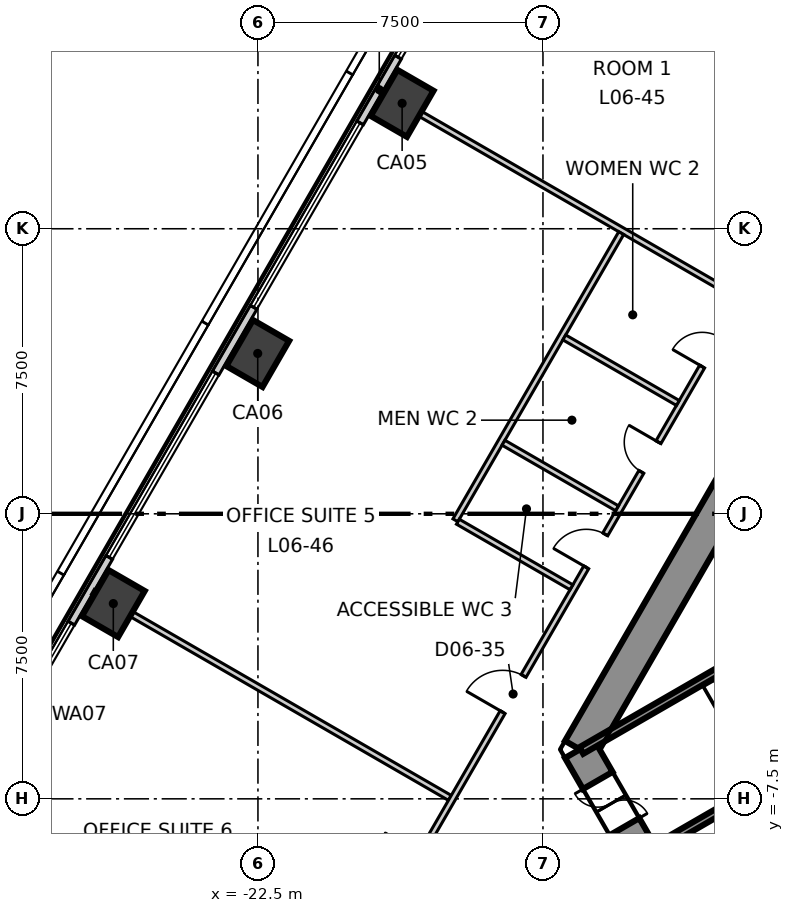
"""IFC4 building model, lengths in metres.
Left out: names, types, materials, properties, quantities, classifications, styles, units other than length and angle.
Written with IfcOpenShell. Run it as: python <this file> out.ifc"""

import sys

from ifc_helpers import new_model, si_unit, direction, frame, frame_2d, origin, origin_2d, place, context, subcontext, project, spatial, polyline, rectangle, outline, extrude, element, fill, save


model = new_model("IFC4")
c1 = context("Model", 3, precision=1e-05, world=origin(), true_north=direction((0.0, 1.0)))
c2 = subcontext(c1, "Body", "Model", "MODEL_VIEW")
j1 = project(units=[si_unit("LENGTHUNIT", "METRE"), si_unit("PLANEANGLEUNIT", "RADIAN")], contexts=[c1])
p1 = place(None, origin())
s1 = spatial("IfcSite", under=j1, at=p1, CompositionType="ELEMENT")
p2 = place(p1, origin())
s2 = spatial("IfcBuilding", under=s1, at=p2, CompositionType="ELEMENT")
p3 = place(p2, frame((0.0, 0.0, 35.3)))
s3 = spatial("IfcBuildingStorey", under=s2, at=p3, CompositionType="ELEMENT", Elevation=35.3)
p4 = place(p3, frame((-1.645, 15.25, -0.3), z_axis=(0.0, 0.0, 1.0), x_axis=(-0.500026485275, -0.866010111964, 0.0)))
e1 = element("IfcWall", 1, at=p4, inside=s3, PredefinedType="SHEAR", context=c2, shape_type="SweptSolid", body=[
    extrude(outline(polyline([(-0.26, -0.45), (1.685, -0.45), (3.63, -0.45), (5.576, -0.45), (7.521, -0.45), (9.466, -0.449), (11.411, -0.449), (13.357, -0.449), (15.302, -0.449), (17.247, -0.449), (19.192, -0.449), (21.138, -0.449), (23.083, -0.449), (25.028, -0.449), (24.509, 0.45), (22.644, 0.45), (20.778, 0.45), (18.913, 0.45), (17.048, 0.45), (15.182, 0.449), (13.317, 0.449), (11.452, 0.449), (9.587, 0.449), (7.721, 0.449), (5.856, 0.449), (3.991, 0.449), (2.125, 0.449), (0.26, 0.449), (-0.26, -0.45)])), origin(), (0.0, 0.0, 1.0), 4.0),
])
p5 = place(p4, frame((11.834, 0.0, 0.3)))
e2 = element("IfcOpeningElement", 2, at=p5, cuts=e1, PredefinedType="OPENING", context=c2, shape_type="SweptSolid", body=[
    extrude(rectangle(XDim=1.1, YDim=2.1, at=frame_2d((0.55, 1.05))), frame((0.0, 0.46, 0.0), z_axis=(0.0, -1.0, 0.0), x_axis=(1.0, 0.0, 0.0)), (0.0, 0.0, 1.0), 0.92),
])
p6 = place(p4, frame((4.842, 0.0, 0.3)))
e3 = element("IfcOpeningElement", 3, at=p6, cuts=e1, PredefinedType="OPENING", context=c2, shape_type="SweptSolid", body=[
    extrude(rectangle(XDim=1.0, YDim=2.1, at=frame_2d((0.5, 1.05))), frame((0.0, 0.46, 0.0), z_axis=(0.0, -1.0, 0.0), x_axis=(1.0, 0.0, 0.0)), (0.0, 0.0, 1.0), 0.92),
])
p7 = place(p3, frame((-14.03, -6.2, -0.3), z_axis=(0.0, 0.0, 1.0), x_axis=(0.500111984565, -0.865960739811, 0.0)))
e4 = element("IfcWall", 4, at=p7, inside=s3, PredefinedType="SHEAR", context=c2, shape_type="SweptSolid", body=[
    extrude(outline(polyline([(-0.26, -0.449), (1.646, -0.449), (3.551, -0.45), (3.032, 0.45), (1.646, 0.45), (0.26, 0.45), (-0.26, -0.449)])), origin(), (0.0, 0.0, 1.0), 4.0),
])
p8 = place(p7, frame((0.946, 0.0, 0.3)))
e5 = element("IfcOpeningElement", 5, at=p8, cuts=e4, PredefinedType="OPENING", context=c2, shape_type="SweptSolid", body=[
    extrude(rectangle(XDim=1.4, YDim=2.1, at=frame_2d((0.7, 1.05))), frame((0.0, 0.46, 0.0), z_axis=(0.0, -1.0, 0.0), x_axis=(1.0, 0.0, 0.0)), (0.0, 0.0, 1.0), 0.92),
])
for number, where, z_axis, x_axis in (
    (6, (-18.706, 10.8, -0.3), (0.0, 0.0, 1.0), (0.5, 0.866, 0.0)),
    (7, (-22.506, 4.219, -0.3), (0.0, 0.0, 1.0), (0.5, 0.866, 0.0)),
    (8, (-26.306, -2.362, -0.3), (0.0, 0.0, 1.0), (0.5, 0.866, 0.0)),
):
    element("IfcColumn", number, at=place(p3, frame(where, z_axis=z_axis, x_axis=x_axis)), inside=s3, PredefinedType="COLUMN", context=c2, shape_type="SweptSolid", body=[
        extrude(rectangle(XDim=1.4, YDim=1.1, at=origin_2d()), origin(), (0.0, 0.0, 1.0), 4.0),
    ])
p9 = place(p3, frame((-3.462, 38.603, 0.0), z_axis=(0.0, 0.0, 1.0), x_axis=(-0.500012207976, -0.866018355391, 0.0)))
e9 = element("IfcWall", 9, at=p9, inside=s3, PredefinedType="ELEMENTEDWALL", context=c2, shape_type="SweptSolid", body=[
    extrude(rectangle(XDim=63.381, YDim=0.2, at=frame_2d((31.69, 0.0))), origin(), (0.0, 0.0, 1.0), 3.7),
])
p10 = place(p9, frame((2.302, 0.0, 0.9)))
e10 = element("IfcOpeningElement", 10, at=p10, cuts=e9, PredefinedType="OPENING", context=c2, shape_type="SweptSolid", body=[
    extrude(rectangle(XDim=5.6, YDim=2.5, at=frame_2d((2.8, 1.25))), frame((0.0, 0.11, 0.0), z_axis=(0.0, -1.0, 0.0), x_axis=(1.0, 0.0, 0.0)), (0.0, 0.0, 1.0), 0.22),
])
p11 = place(p9, frame((9.902, 0.0, 0.9)))
e11 = element("IfcOpeningElement", 11, at=p11, cuts=e9, PredefinedType="OPENING", context=c2, shape_type="SweptSolid", body=[
    extrude(rectangle(XDim=5.6, YDim=2.5, at=frame_2d((2.8, 1.25))), frame((0.0, 0.11, 0.0), z_axis=(0.0, -1.0, 0.0), x_axis=(1.0, 0.0, 0.0)), (0.0, 0.0, 1.0), 0.22),
])
p12 = place(p9, frame((17.501, 0.0, 0.9)))
e12 = element("IfcOpeningElement", 12, at=p12, cuts=e9, PredefinedType="OPENING", context=c2, shape_type="SweptSolid", body=[
    extrude(rectangle(XDim=5.6, YDim=2.5, at=frame_2d((2.8, 1.25))), frame((0.0, 0.11, 0.0), z_axis=(0.0, -1.0, 0.0), x_axis=(1.0, 0.0, 0.0)), (0.0, 0.0, 1.0), 0.22),
])
p13 = place(p9, frame((25.1, 0.0, 0.9)))
e13 = element("IfcOpeningElement", 13, at=p13, cuts=e9, PredefinedType="OPENING", context=c2, shape_type="SweptSolid", body=[
    extrude(rectangle(XDim=5.6, YDim=2.5, at=frame_2d((2.8, 1.25))), frame((0.0, 0.11, 0.0), z_axis=(0.0, -1.0, 0.0), x_axis=(1.0, 0.0, 0.0)), (0.0, 0.0, 1.0), 0.22),
])
p14 = place(p9, frame((32.7, 0.0, 0.9)))
e14 = element("IfcOpeningElement", 14, at=p14, cuts=e9, PredefinedType="OPENING", context=c2, shape_type="SweptSolid", body=[
    extrude(rectangle(XDim=5.6, YDim=2.5, at=frame_2d((2.8, 1.25))), frame((0.0, 0.11, 0.0), z_axis=(0.0, -1.0, 0.0), x_axis=(1.0, 0.0, 0.0)), (0.0, 0.0, 1.0), 0.22),
])
p15 = place(p9, frame((40.299, 0.0, 0.9)))
e15 = element("IfcOpeningElement", 15, at=p15, cuts=e9, PredefinedType="OPENING", context=c2, shape_type="SweptSolid", body=[
    extrude(rectangle(XDim=5.6, YDim=2.5, at=frame_2d((2.8, 1.25))), frame((0.0, 0.11, 0.0), z_axis=(0.0, -1.0, 0.0), x_axis=(1.0, 0.0, 0.0)), (0.0, 0.0, 1.0), 0.22),
])
p16 = place(p9, frame((47.899, 0.0, 0.9)))
e16 = element("IfcOpeningElement", 16, at=p16, cuts=e9, PredefinedType="OPENING", context=c2, shape_type="SweptSolid", body=[
    extrude(rectangle(XDim=5.6, YDim=2.5, at=frame_2d((2.8, 1.25))), frame((0.0, 0.11, 0.0), z_axis=(0.0, -1.0, 0.0), x_axis=(1.0, 0.0, 0.0)), (0.0, 0.0, 1.0), 0.22),
])
p17 = place(p9, frame((55.498, 0.0, 0.9)))
e17 = element("IfcOpeningElement", 17, at=p17, cuts=e9, PredefinedType="OPENING", context=c2, shape_type="SweptSolid", body=[
    extrude(rectangle(XDim=5.6, YDim=2.5, at=frame_2d((2.8, 1.25))), frame((0.0, 0.11, 0.0), z_axis=(0.0, -1.0, 0.0), x_axis=(1.0, 0.0, 0.0)), (0.0, 0.0, 1.0), 0.22),
])
p18 = place(p3, frame((-26.843, -2.052, 0.0), z_axis=(0.0, 0.0, 1.0), x_axis=(0.86602515287, -0.500000434597, 0.0)))
e18 = element("IfcWall", 18, at=p18, inside=s3, PredefinedType="PARTITIONING", context=c2, shape_type="SweptSolid", body=[
    extrude(rectangle(XDim=10.846, YDim=0.15, at=frame_2d((5.423, 0.0))), origin(), (0.0, 0.0, 1.0), 3.7),
])
p19 = place(p3, frame((-19.497, -11.17, 0.0), z_axis=(0.0, 0.0, 1.0), x_axis=(0.499998854553, 0.866026065108, 0.0)))
e19 = element("IfcWall", 19, at=p19, inside=s3, PredefinedType="PARTITIONING", context=c2, shape_type="SweptSolid", body=[
    extrude(rectangle(XDim=38.994, YDim=0.15, at=frame_2d((19.497, 0.0))), origin(), (0.0, 0.0, 1.0), 3.7),
])
p20 = place(p19, frame((36.244, 0.0, 0.0)))
e20 = element("IfcOpeningElement", 20, at=p20, cuts=e19, PredefinedType="OPENING", context=c2, shape_type="SweptSolid", body=[
    extrude(rectangle(XDim=1.1, YDim=2.1, at=frame_2d((0.55, 1.05))), frame((0.0, 0.085, 0.0), z_axis=(0.0, -1.0, 0.0), x_axis=(1.0, 0.0, 0.0)), (0.0, 0.0, 1.0), 0.17),
])
p21 = place(p19, frame((29.171, 0.0, 0.0)))
e21 = element("IfcOpeningElement", 21, at=p21, cuts=e19, PredefinedType="OPENING", context=c2, shape_type="SweptSolid", body=[
    extrude(rectangle(XDim=1.0, YDim=2.1, at=frame_2d((0.5, 1.05))), frame((0.0, 0.085, 0.0), z_axis=(0.0, -1.0, 0.0), x_axis=(1.0, 0.0, 0.0)), (0.0, 0.0, 1.0), 0.17),
])
p22 = place(p19, frame((32.971, 0.0, 0.0)))
e22 = element("IfcOpeningElement", 22, at=p22, cuts=e19, PredefinedType="OPENING", context=c2, shape_type="SweptSolid", body=[
    extrude(rectangle(XDim=0.9, YDim=2.1, at=frame_2d((0.45, 1.05))), frame((0.0, 0.085, 0.0), z_axis=(0.0, -1.0, 0.0), x_axis=(1.0, 0.0, 0.0)), (0.0, 0.0, 1.0), 0.17),
])
p23 = place(p19, frame((22.771, 0.0, 0.0)))
e23 = element("IfcOpeningElement", 23, at=p23, cuts=e19, PredefinedType="OPENING", context=c2, shape_type="SweptSolid", body=[
    extrude(rectangle(XDim=1.0, YDim=2.1, at=frame_2d((0.5, 1.05))), frame((0.0, 0.085, 0.0), z_axis=(0.0, -1.0, 0.0), x_axis=(1.0, 0.0, 0.0)), (0.0, 0.0, 1.0), 0.17),
])
p24 = place(p19, frame((6.872, 0.0, 0.0)))
e24 = element("IfcOpeningElement", 24, at=p24, cuts=e19, PredefinedType="OPENING", context=c2, shape_type="SweptSolid", body=[
    extrude(rectangle(XDim=1.1, YDim=2.1, at=frame_2d((0.55, 1.05))), frame((0.0, 0.085, 0.0), z_axis=(0.0, -1.0, 0.0), x_axis=(1.0, 0.0, 0.0)), (0.0, 0.0, 1.0), 0.17),
])
p25 = place(p19, frame((17.372, 0.0, 0.0)))
e25 = element("IfcOpeningElement", 25, at=p25, cuts=e19, PredefinedType="OPENING", context=c2, shape_type="SweptSolid", body=[
    extrude(rectangle(XDim=0.9, YDim=2.1, at=frame_2d((0.45, 1.05))), frame((0.0, 0.085, 0.0), z_axis=(0.0, -1.0, 0.0), x_axis=(1.0, 0.0, 0.0)), (0.0, 0.0, 1.0), 0.17),
])
p26 = place(p19, frame((14.172, 0.0, 0.0)))
e26 = element("IfcOpeningElement", 26, at=p26, cuts=e19, PredefinedType="OPENING", context=c2, shape_type="SweptSolid", body=[
    extrude(rectangle(XDim=0.9, YDim=2.1, at=frame_2d((0.45, 1.05))), frame((0.0, 0.085, 0.0), z_axis=(0.0, -1.0, 0.0), x_axis=(1.0, 0.0, 0.0)), (0.0, 0.0, 1.0), 0.17),
])
p27 = place(p19, frame((11.272, 0.0, 0.0)))
e27 = element("IfcOpeningElement", 27, at=p27, cuts=e19, PredefinedType="OPENING", context=c2, shape_type="SweptSolid", body=[
    extrude(rectangle(XDim=1.0, YDim=2.1, at=frame_2d((0.5, 1.05))), frame((0.0, 0.085, 0.0), z_axis=(0.0, -1.0, 0.0), x_axis=(1.0, 0.0, 0.0)), (0.0, 0.0, 1.0), 0.17),
])
p28 = place(p19, frame((1.473, 0.0, 0.0)))
e28 = element("IfcOpeningElement", 28, at=p28, cuts=e19, PredefinedType="OPENING", context=c2, shape_type="SweptSolid", body=[
    extrude(rectangle(XDim=1.1, YDim=2.1, at=frame_2d((0.55, 1.05))), frame((0.0, 0.085, 0.0), z_axis=(0.0, -1.0, 0.0), x_axis=(1.0, 0.0, 0.0)), (0.0, 0.0, 1.0), 0.17),
])
p29 = place(p3, frame((-19.243, 11.11, 0.0), z_axis=(0.0, 0.0, 1.0), x_axis=(0.866036004841, -0.499981637982, 0.0)))
e29 = element("IfcWall", 29, at=p29, inside=s3, PredefinedType="PARTITIONING", context=c2, shape_type="SweptSolid", body=[
    extrude(rectangle(XDim=10.845, YDim=0.15, at=frame_2d((5.422, 0.0))), origin(), (0.0, 0.0, 1.0), 3.2),
])
p30 = place(p3, frame((-17.304, -0.171, 0.0), z_axis=(0.0, 0.0, 1.0), x_axis=(0.500054279689, 0.865994063124, 0.0)))
e30 = element("IfcWall", 30, at=p30, inside=s3, PredefinedType="PARTITIONING", context=c2, shape_type="SweptSolid", body=[
    extrude(rectangle(XDim=8.725, YDim=0.15, at=frame_2d((4.363, 0.0))), origin(), (0.0, 0.0, 1.0), 3.7),
])
for number, where, z_axis, x_axis in (
    (31, (-17.239, -0.208, 0.0), (0.0, 0.0, 1.0), (0.866, -0.5, 0.0)),
    (32, (-16.039, 1.87, 0.0), (0.0, 0.0, 1.0), (0.866, -0.5, 0.0)),
    (33, (-14.439, 4.641, 0.0), (0.0, 0.0, 1.0), (0.866, -0.5, 0.0)),
):
    element("IfcWall", number, at=place(p3, frame(where, z_axis=z_axis, x_axis=x_axis)), inside=s3, PredefinedType="PARTITIONING", context=c2, shape_type="SweptSolid", body=[
        extrude(rectangle(XDim=3.45, YDim=0.15, at=frame_2d((1.725, 0.0))), origin(), (0.0, 0.0, 1.0), 3.7),
    ])
p31 = place(p3, frame((-13.99, -6.229, 0.0), z_axis=(0.0, 0.0, 1.0), x_axis=(0.866060059011, 0.499939970583, 0.0)))
e34 = element("IfcWall", 34, at=p31, inside=s3, PredefinedType="SOLIDWALL", context=c2, shape_type="SweptSolid", body=[
    extrude(rectangle(XDim=8.615, YDim=0.2, at=frame_2d((4.307, 0.0))), origin(), (0.0, 0.0, 1.0), 3.7),
])
p32 = place(p3, frame((-12.39, -9.001, 0.0), z_axis=(0.0, 0.0, 1.0), x_axis=(0.866010975815, 0.500024989144, 0.0)))
e35 = element("IfcWall", 35, at=p32, inside=s3, PredefinedType="SOLIDWALL", context=c2, shape_type="SweptSolid", body=[
    extrude(rectangle(XDim=8.615, YDim=0.2, at=frame_2d((4.308, 0.0))), origin(), (0.0, 0.0, 1.0), 3.7),
])
p33 = place(p13, origin())
e36 = element("IfcWindow", 36, at=p33, inside=s3, PartitioningType="SINGLE_PANEL", PredefinedType="WINDOW", context=c2, shape_type="SweptSolid", body=[
    extrude(rectangle(XDim=5.6, YDim=2.5, at=frame_2d((2.8, 1.25))), frame((0.0, 0.03, 0.0), z_axis=(0.0, -1.0, 0.0), x_axis=(1.0, 0.0, 0.0)), (0.0, 0.0, 1.0), 0.06),
])
fill(e13, e36)
p34 = place(p14, origin())
e37 = element("IfcWindow", 37, at=p34, inside=s3, PartitioningType="SINGLE_PANEL", PredefinedType="WINDOW", context=c2, shape_type="SweptSolid", body=[
    extrude(rectangle(XDim=5.6, YDim=2.5, at=frame_2d((2.8, 1.25))), frame((0.0, 0.03, 0.0), z_axis=(0.0, -1.0, 0.0), x_axis=(1.0, 0.0, 0.0)), (0.0, 0.0, 1.0), 0.06),
])
fill(e14, e37)
p35 = place(p15, origin())
e38 = element("IfcWindow", 38, at=p35, inside=s3, PartitioningType="SINGLE_PANEL", PredefinedType="WINDOW", context=c2, shape_type="SweptSolid", body=[
    extrude(rectangle(XDim=5.6, YDim=2.5, at=frame_2d((2.8, 1.25))), frame((0.0, 0.03, 0.0), z_axis=(0.0, -1.0, 0.0), x_axis=(1.0, 0.0, 0.0)), (0.0, 0.0, 1.0), 0.06),
])
fill(e15, e38)
p36 = place(p16, origin())
e39 = element("IfcWindow", 39, at=p36, inside=s3, PartitioningType="SINGLE_PANEL", PredefinedType="WINDOW", context=c2, shape_type="SweptSolid", body=[
    extrude(rectangle(XDim=5.6, YDim=2.5, at=frame_2d((2.8, 1.25))), frame((0.0, 0.03, 0.0), z_axis=(0.0, -1.0, 0.0), x_axis=(1.0, 0.0, 0.0)), (0.0, 0.0, 1.0), 0.06),
])
fill(e16, e39)
p37 = place(p24, origin())
e40 = element("IfcDoor", 40, at=p37, inside=s3, OperationType="SINGLE_SWING_RIGHT", PredefinedType="DOOR", context=c2, shape_type="SweptSolid", body=[
    extrude(rectangle(XDim=1.1, YDim=2.1, at=frame_2d((0.55, 1.05))), frame((0.0, 0.025, 0.0), z_axis=(0.0, -1.0, 0.0), x_axis=(1.0, 0.0, 0.0)), (0.0, 0.0, 1.0), 0.05),
])
fill(e24, e40)
p38 = place(p25, origin())
e41 = element("IfcDoor", 41, at=p38, inside=s3, OperationType="SINGLE_SWING_RIGHT", PredefinedType="DOOR", context=c2, shape_type="SweptSolid", body=[
    extrude(rectangle(XDim=0.9, YDim=2.1, at=frame_2d((0.45, 1.05))), frame((0.0, 0.025, 0.0), z_axis=(0.0, -1.0, 0.0), x_axis=(1.0, 0.0, 0.0)), (0.0, 0.0, 1.0), 0.05),
])
fill(e25, e41)
p39 = place(p26, origin())
e42 = element("IfcDoor", 42, at=p39, inside=s3, OperationType="SINGLE_SWING_LEFT", PredefinedType="DOOR", context=c2, shape_type="SweptSolid", body=[
    extrude(rectangle(XDim=0.9, YDim=2.1, at=frame_2d((0.45, 1.05))), frame((0.0, 0.025, 0.0), z_axis=(0.0, -1.0, 0.0), x_axis=(1.0, 0.0, 0.0)), (0.0, 0.0, 1.0), 0.05),
])
fill(e26, e42)
p40 = place(p27, origin())
e43 = element("IfcDoor", 43, at=p40, inside=s3, OperationType="SINGLE_SWING_RIGHT", PredefinedType="DOOR", context=c2, shape_type="SweptSolid", body=[
    extrude(rectangle(XDim=1.0, YDim=2.1, at=frame_2d((0.5, 1.05))), frame((0.0, 0.025, 0.0), z_axis=(0.0, -1.0, 0.0), x_axis=(1.0, 0.0, 0.0)), (0.0, 0.0, 1.0), 0.05),
])
fill(e27, e43)
p41 = place(p8, origin())
e44 = element("IfcDoor", 44, at=p41, inside=s3, OperationType="DOUBLE_DOOR_SINGLE_SWING", PredefinedType="DOOR", context=c2, shape_type="SweptSolid", body=[
    extrude(rectangle(XDim=1.4, YDim=2.1, at=frame_2d((0.7, 1.05))), frame((0.0, 0.025, 0.0), z_axis=(0.0, -1.0, 0.0), x_axis=(1.0, 0.0, 0.0)), (0.0, 0.0, 1.0), 0.05),
])
fill(e5, e44)
save(model, sys.argv[1])
